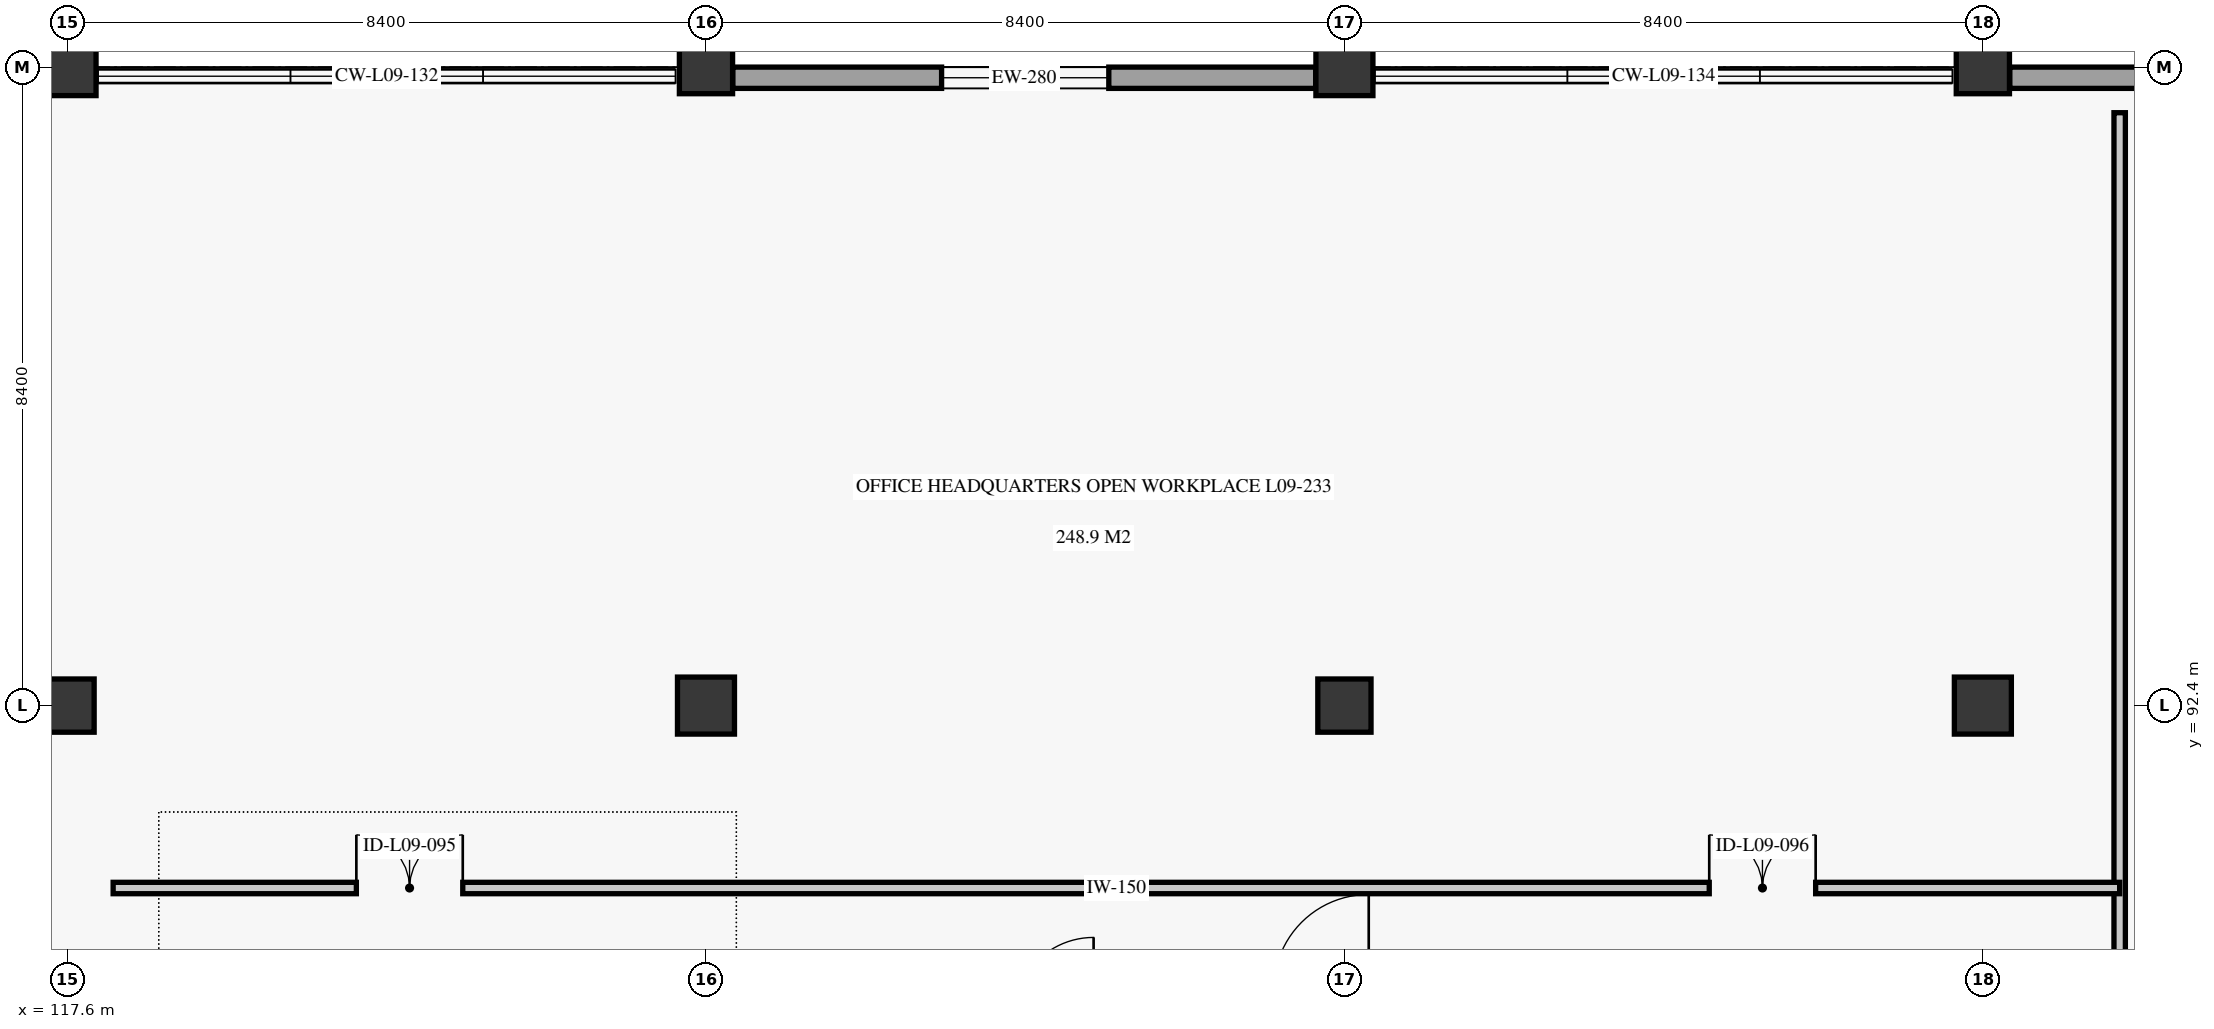
"""IFC4 building model, lengths in metres.
Left out: names, types, materials, properties, quantities, classifications, styles, units other than length and angle.
Written with IfcOpenShell. Run it as: python <this file> out.ifc"""

import sys

from ifc_helpers import new_model, si_unit, direction, frame, frame_2d, origin, origin_2d, place, context, subcontext, project, spatial, rectangle, extrude, element, fill, save


model = new_model("IFC4")
c1 = context("Model", 3, precision=1e-05, world=origin(), true_north=direction((0.0, 1.0)))
c2 = subcontext(c1, "Body", "Model", "MODEL_VIEW")
j1 = project(units=[si_unit("LENGTHUNIT", "METRE"), si_unit("PLANEANGLEUNIT", "RADIAN")], contexts=[c1])
p1 = place(None, origin())
s1 = spatial("IfcSite", under=j1, at=p1, CompositionType="ELEMENT")
p2 = place(p1, origin())
s2 = spatial("IfcBuilding", under=s1, at=p2, CompositionType="ELEMENT")
p3 = place(p2, frame((0.0, 0.0, 38.7)))
s3 = spatial("IfcBuildingStorey", under=s2, at=p3, CompositionType="ELEMENT", Elevation=38.7)
p4 = place(p3, frame((117.6, 92.4, 0.0), z_axis=(0.0, 0.0, 1.0), x_axis=(1.0, 0.0, 0.0)))
e1 = element("IfcColumn", 1, at=p4, inside=s3, PredefinedType="COLUMN", context=c2, shape_type="SweptSolid", body=[
    extrude(rectangle(XDim=0.7, YDim=0.7, at=origin_2d()), origin(), (0.0, 0.0, 1.0), 3.72),
])
for number, where, z_axis, x_axis in (
    (2, (117.6, 100.8, 0.0), (0.0, 0.0, 1.0), (1.0, 0.0, 0.0)),
    (3, (126.0, 92.4, 0.0), (0.0, 0.0, 1.0), (1.0, 0.0, 0.0)),
):
    element("IfcColumn", number, at=place(p3, frame(where, z_axis=z_axis, x_axis=x_axis)), inside=s3, PredefinedType="COLUMN", context=c2, shape_type="SweptSolid", body=[
        extrude(rectangle(XDim=0.75, YDim=0.75, at=origin_2d()), origin(), (0.0, 0.0, 1.0), 3.72),
    ])
for number, where, z_axis, x_axis in (
    (4, (126.0, 100.8, 0.0), (0.0, 0.0, 1.0), (1.0, 0.0, 0.0)),
    (5, (134.4, 92.4, 0.0), (0.0, 0.0, 1.0), (1.0, 0.0, 0.0)),
):
    element("IfcColumn", number, at=place(p3, frame(where, z_axis=z_axis, x_axis=x_axis)), inside=s3, PredefinedType="COLUMN", context=c2, shape_type="SweptSolid", body=[
        extrude(rectangle(XDim=0.7, YDim=0.7, at=origin_2d()), origin(), (0.0, 0.0, 1.0), 3.72),
    ])
for number, where, z_axis, x_axis in (
    (6, (134.4, 100.8, 0.0), (0.0, 0.0, 1.0), (1.0, 0.0, 0.0)),
    (7, (142.8, 92.4, 0.0), (0.0, 0.0, 1.0), (1.0, 0.0, 0.0)),
):
    element("IfcColumn", number, at=place(p3, frame(where, z_axis=z_axis, x_axis=x_axis)), inside=s3, PredefinedType="COLUMN", context=c2, shape_type="SweptSolid", body=[
        extrude(rectangle(XDim=0.75, YDim=0.75, at=origin_2d()), origin(), (0.0, 0.0, 1.0), 3.72),
    ])
p5 = place(p3, frame((142.8, 100.8, 0.0), z_axis=(0.0, 0.0, 1.0), x_axis=(1.0, 0.0, 0.0)))
e8 = element("IfcColumn", 8, at=p5, inside=s3, PredefinedType="COLUMN", context=c2, shape_type="SweptSolid", body=[
    extrude(rectangle(XDim=0.7, YDim=0.7, at=origin_2d()), origin(), (0.0, 0.0, 1.0), 3.72),
])
p6 = place(p3, frame((126.352, 100.66, 0.0), z_axis=(0.0, 0.0, 1.0), x_axis=(1.0, 0.0, 0.0)))
e9 = element("IfcWall", 9, at=p6, inside=s3, PredefinedType="SOLIDWALL", context=c2, shape_type="SweptSolid", body=[
    extrude(rectangle(XDim=7.67, YDim=0.28, at=frame_2d((3.835, 0.0))), origin(), (0.0, 0.0, 1.0), 3.04),
])
p7 = place(p6, frame((2.748, 0.0, 0.85)))
e10 = element("IfcOpeningElement", 10, at=p7, cuts=e9, PredefinedType="OPENING", context=c2, shape_type="SweptSolid", body=[
    extrude(rectangle(XDim=2.2, YDim=1.8, at=frame_2d((1.1, 0.9))), frame((0.0, 0.15, 0.0), z_axis=(0.0, -1.0, 0.0), x_axis=(1.0, 0.0, 0.0)), (0.0, 0.0, 1.0), 0.3),
])
p8 = place(p3, frame((143.154, 100.66, 0.0), z_axis=(0.0, 0.0, 1.0), x_axis=(1.0, 0.0, 0.0)))
e11 = element("IfcWall", 11, at=p8, inside=s3, PredefinedType="SOLIDWALL", context=c2, shape_type="SweptSolid", body=[
    extrude(rectangle(XDim=7.668, YDim=0.28, at=frame_2d((3.834, 0.0))), origin(), (0.0, 0.0, 1.0), 3.04),
])
p9 = place(p8, frame((3.021, 0.0, 0.85)))
e12 = element("IfcOpeningElement", 12, at=p9, cuts=e11, PredefinedType="OPENING", context=c2, shape_type="SweptSolid", body=[
    extrude(rectangle(XDim=1.65, YDim=1.75, at=frame_2d((0.825, 0.875))), frame((0.0, 0.15, 0.0), z_axis=(0.0, -1.0, 0.0), x_axis=(1.0, 0.0, 0.0)), (0.0, 0.0, 1.0), 0.3),
])
p10 = place(p3, frame((144.6, 67.8, 0.0), z_axis=(0.0, 0.0, 1.0), x_axis=(0.0, 1.0, 0.0)))
e13 = element("IfcWall", 13, at=p10, inside=s3, PredefinedType="PARTITIONING", context=c2, shape_type="SweptSolid", body=[
    extrude(rectangle(XDim=32.4, YDim=0.15, at=frame_2d((16.2, 0.0))), origin(), (0.0, 0.0, 1.0), 3.34),
])
p11 = place(p10, frame((4.2, 0.0, 0.0)))
e14 = element("IfcOpeningElement", 14, at=p11, cuts=e13, PredefinedType="OPENING", context=c2, shape_type="SweptSolid", body=[
    extrude(rectangle(XDim=1.3, YDim=2.35, at=frame_2d((0.65, 1.175))), frame((0.0, 0.085, 0.0), z_axis=(0.0, -1.0, 0.0), x_axis=(1.0, 0.0, 0.0)), (0.0, 0.0, 1.0), 0.17),
])
p12 = place(p10, frame((18.0, 0.0, 0.0)))
e15 = element("IfcOpeningElement", 15, at=p12, cuts=e13, PredefinedType="OPENING", context=c2, shape_type="SweptSolid", body=[
    extrude(rectangle(XDim=1.3, YDim=2.35, at=frame_2d((0.65, 1.175))), frame((0.0, 0.085, 0.0), z_axis=(0.0, -1.0, 0.0), x_axis=(1.0, 0.0, 0.0)), (0.0, 0.0, 1.0), 0.17),
])
p13 = place(p3, frame((118.2, 90.0, 0.0), z_axis=(0.0, 0.0, 1.0), x_axis=(1.0, 0.0, 0.0)))
e16 = element("IfcWall", 16, at=p13, inside=s3, PredefinedType="PARTITIONING", context=c2, shape_type="SweptSolid", body=[
    extrude(rectangle(XDim=26.4, YDim=0.15, at=frame_2d((13.2, 0.0))), origin(), (0.0, 0.0, 1.0), 3.34),
])
p14 = place(p13, frame((3.2, 0.0, 0.0)))
e17 = element("IfcOpeningElement", 17, at=p14, cuts=e16, PredefinedType="OPENING", context=c2, shape_type="SweptSolid", body=[
    extrude(rectangle(XDim=1.4, YDim=2.35, at=frame_2d((0.7, 1.175))), frame((0.0, 0.085, 0.0), z_axis=(0.0, -1.0, 0.0), x_axis=(1.0, 0.0, 0.0)), (0.0, 0.0, 1.0), 0.17),
])
p15 = place(p13, frame((21.0, 0.0, 0.0)))
e18 = element("IfcOpeningElement", 18, at=p15, cuts=e16, PredefinedType="OPENING", context=c2, shape_type="SweptSolid", body=[
    extrude(rectangle(XDim=1.4, YDim=2.35, at=frame_2d((0.7, 1.175))), frame((0.0, 0.085, 0.0), z_axis=(0.0, -1.0, 0.0), x_axis=(1.0, 0.0, 0.0)), (0.0, 0.0, 1.0), 0.17),
])
p16 = place(p7, origin())
e19 = element("IfcWindow", 19, at=p16, inside=s3, PartitioningType="SINGLE_PANEL", PredefinedType="WINDOW", context=c2, shape_type="SweptSolid", body=[
    extrude(rectangle(XDim=2.2, YDim=1.8, at=frame_2d((1.1, 0.9))), frame((0.0, 0.03, 0.0), z_axis=(0.0, -1.0, 0.0), x_axis=(1.0, 0.0, 0.0)), (0.0, 0.0, 1.0), 0.06),
])
fill(e10, e19)
p17 = place(p14, origin())
e20 = element("IfcDoor", 20, at=p17, inside=s3, OperationType="DOUBLE_DOOR_SINGLE_SWING", PredefinedType="DOOR", context=c2, shape_type="SweptSolid", body=[
    extrude(rectangle(XDim=1.4, YDim=2.35, at=frame_2d((0.7, 1.175))), frame((0.0, 0.025, 0.0), z_axis=(0.0, -1.0, 0.0), x_axis=(1.0, 0.0, 0.0)), (0.0, 0.0, 1.0), 0.05),
])
fill(e17, e20)
p18 = place(p15, origin())
e21 = element("IfcDoor", 21, at=p18, inside=s3, OperationType="DOUBLE_DOOR_SINGLE_SWING", PredefinedType="DOOR", context=c2, shape_type="SweptSolid", body=[
    extrude(rectangle(XDim=1.4, YDim=2.35, at=frame_2d((0.7, 1.175))), frame((0.0, 0.025, 0.0), z_axis=(0.0, -1.0, 0.0), x_axis=(1.0, 0.0, 0.0)), (0.0, 0.0, 1.0), 0.05),
])
fill(e18, e21)
save(model, sys.argv[1])
